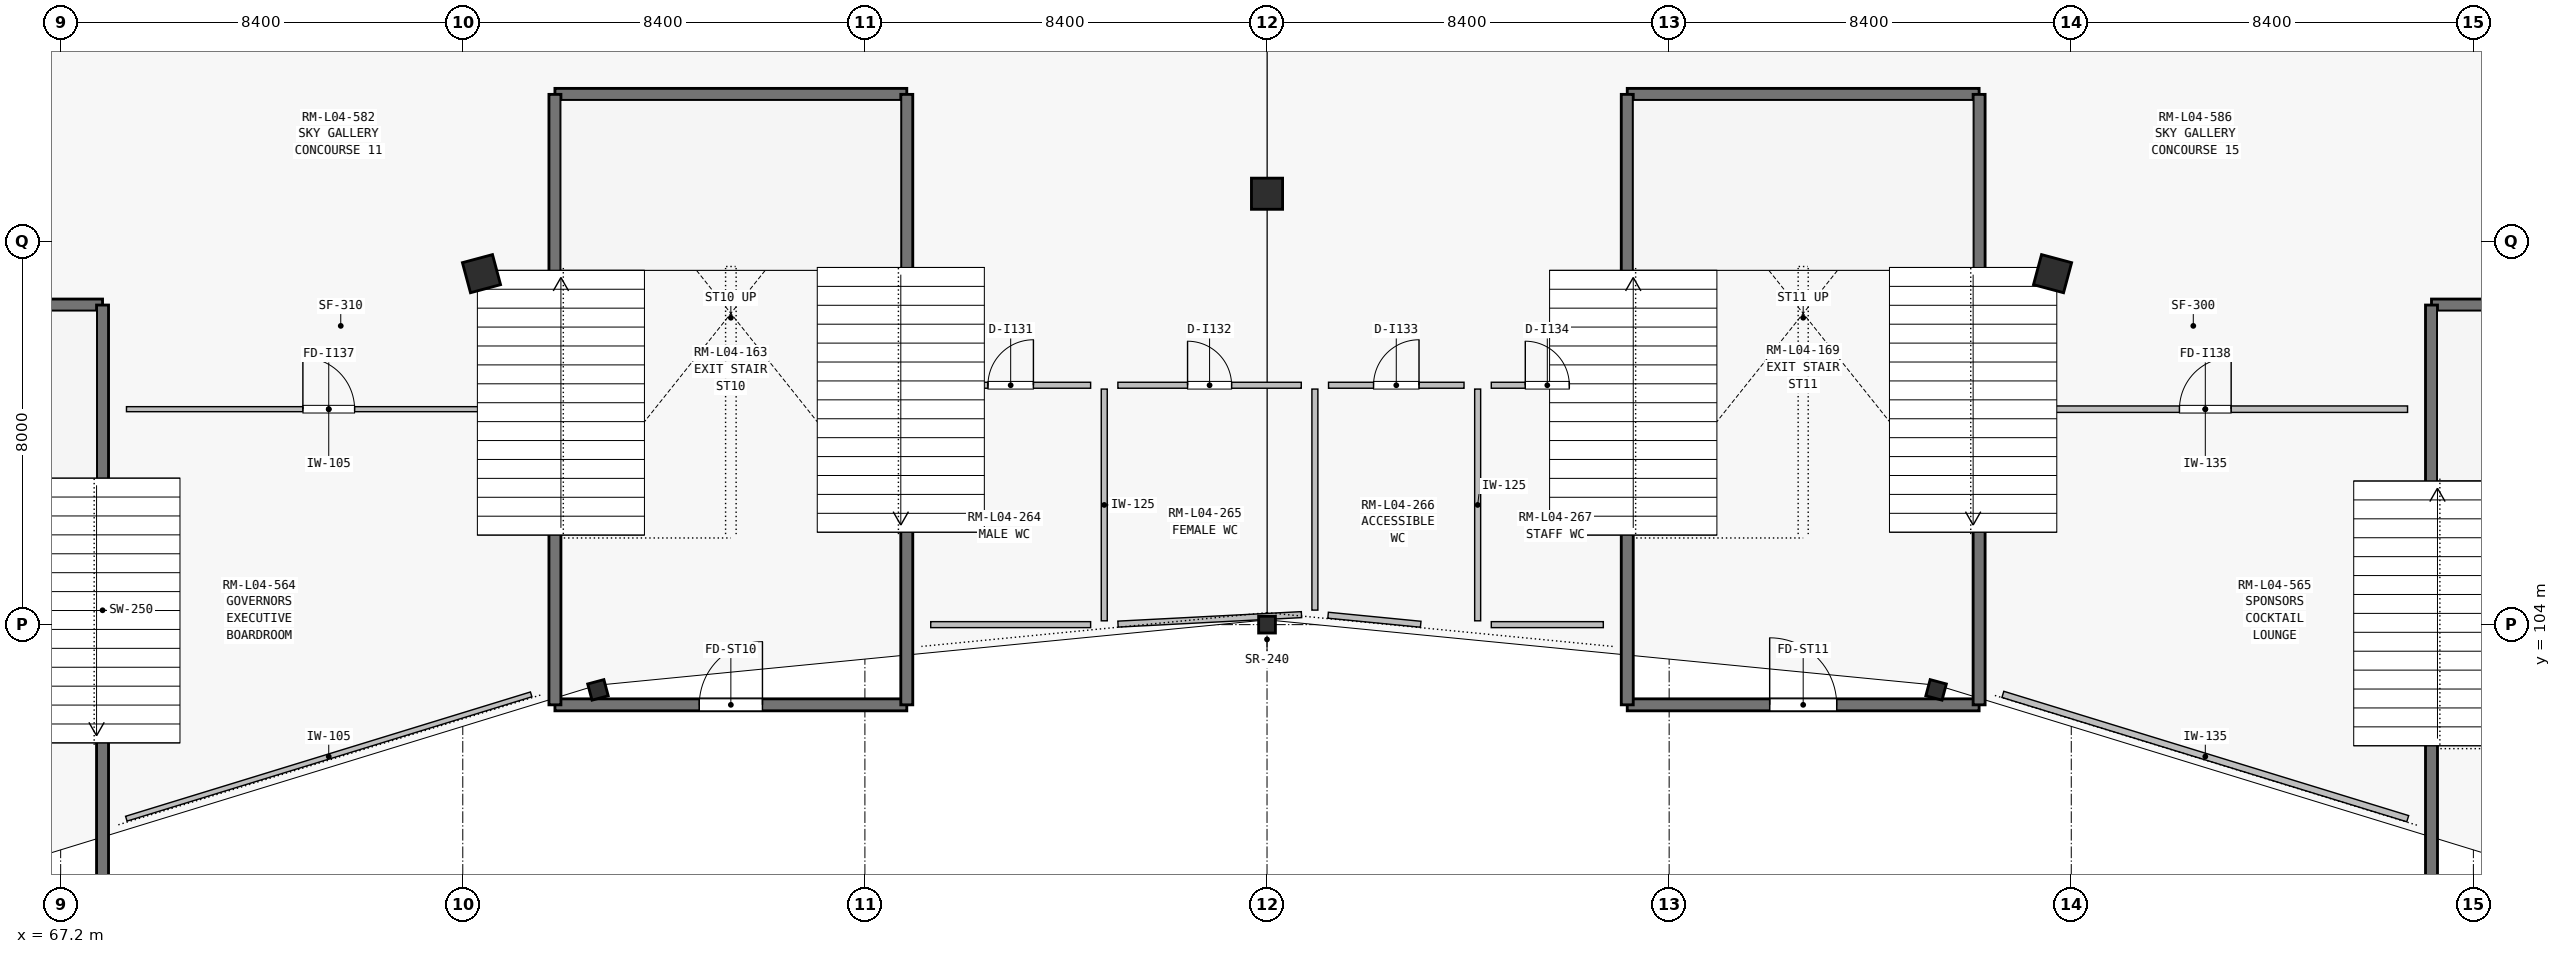
"""IFC4 building model, lengths in metres.
Left out: names, types, materials, properties, quantities, classifications, styles, units other than length and angle.
Written with IfcOpenShell. Run it as: python <this file> out.ifc"""

import sys

from ifc_helpers import new_model, si_unit, direction, frame, frame_2d, origin, origin_2d, place, context, subcontext, project, spatial, rectangle, i_section, extrude, element, fill, save


model = new_model("IFC4")
c1 = context("Model", 3, precision=1e-05, world=origin(), true_north=direction((0.0, 1.0)))
c2 = subcontext(c1, "Body", "Model", "MODEL_VIEW")
j1 = project(units=[si_unit("LENGTHUNIT", "METRE"), si_unit("PLANEANGLEUNIT", "RADIAN")], contexts=[c1])
p1 = place(None, origin())
s1 = spatial("IfcSite", under=j1, at=p1, CompositionType="ELEMENT")
p2 = place(p1, origin())
s2 = spatial("IfcBuilding", under=s1, at=p2, CompositionType="ELEMENT")
p3 = place(p2, frame((0.0, 0.0, 18.9)))
s3 = spatial("IfcBuildingStorey", under=s2, at=p3, CompositionType="ELEMENT", Elevation=18.9)
for number, where, z_axis, x_axis in (
    (1, (106.376, 102.637, 0.0), (0.0, 0.0, 1.0), (0.259, 0.966, 0.0)),
    (2, (92.4, 104.0, 0.0), (0.0, 0.0, 1.0), (0.0, 1.0, 0.0)),
    (3, (78.424, 102.637, 0.0), (0.0, 0.0, 1.0), (-0.259, 0.966, 0.0)),
):
    element("IfcColumn", number, at=place(p3, frame(where, z_axis=z_axis, x_axis=x_axis)), inside=s3, PredefinedType="COLUMN", context=c2, shape_type="SweptSolid", body=[
        extrude(i_section(OverallWidth=0.35, OverallDepth=0.35, WebThickness=0.014, FlangeThickness=0.024, at=origin_2d()), origin(), (0.0, 0.0, 1.0), 4.5),
    ])
for number, where, z_axis, x_axis in (
    (4, (108.809, 111.33, 0.0), (0.0, 0.0, 1.0), (0.259, 0.966, 0.0)),
    (5, (92.4, 113.0, 0.0), (0.0, 0.0, 1.0), (0.0, 1.0, 0.0)),
    (6, (75.991, 111.33, 0.0), (0.0, 0.0, 1.0), (-0.259, 0.966, 0.0)),
):
    element("IfcColumn", number, at=place(p3, frame(where, z_axis=z_axis, x_axis=x_axis)), inside=s3, PredefinedType="COLUMN", context=c2, shape_type="SweptSolid", body=[
        extrude(rectangle(XDim=0.65, YDim=0.65, at=origin_2d()), origin(), (0.0, 0.0, 1.0), 4.5),
    ])
p4 = place(p3, frame((53.1, 115.788, 0.0), z_axis=(0.0, 0.0, 1.0), x_axis=(0.953759231515, 0.300571669159, 0.0)))
e7 = element("IfcWall", 7, at=p4, inside=s3, PredefinedType="PARAPET", context=c2, shape_type="SweptSolid", body=[
    extrude(rectangle(XDim=19.876, YDim=0.225, at=frame_2d((9.938, 0.0))), origin(), (0.0, 0.0, 1.0), 0.95),
])
p5 = place(p3, frame((60.725, 110.675, 0.0), z_axis=(0.0, 0.0, 1.0), x_axis=(1.0, 0.0, 0.0)))
e8 = element("IfcWall", 8, at=p5, inside=s3, PredefinedType="SHEAR", context=c2, shape_type="SweptSolid", body=[
    extrude(rectangle(XDim=7.35, YDim=0.25, at=frame_2d((3.675, 0.0))), origin(), (0.0, 0.0, 1.0), 4.5),
])
p6 = place(p3, frame((68.075, 97.925, 0.0), z_axis=(0.0, 0.0, 1.0), x_axis=(0.0, 1.0, 0.0)))
e9 = element("IfcWall", 9, at=p6, inside=s3, PredefinedType="SHEAR", context=c2, shape_type="SweptSolid", body=[
    extrude(rectangle(XDim=12.75, YDim=0.25, at=frame_2d((6.375, 0.0))), origin(), (0.0, 0.0, 1.0), 4.5),
])
p7 = place(p3, frame((77.525, 102.325, 0.0), z_axis=(0.0, 0.0, 1.0), x_axis=(1.0, 0.0, 0.0)))
e10 = element("IfcWall", 10, at=p7, inside=s3, PredefinedType="SHEAR", context=c2, shape_type="SweptSolid", body=[
    extrude(rectangle(XDim=7.35, YDim=0.25, at=frame_2d((3.675, 0.0))), origin(), (0.0, 0.0, 1.0), 4.5),
])
p8 = place(p7, frame((3.015, 0.0, 0.0)))
e11 = element("IfcOpeningElement", 11, at=p8, cuts=e10, PredefinedType="OPENING", context=c2, shape_type="SweptSolid", body=[
    extrude(rectangle(XDim=1.32, YDim=2.2, at=frame_2d((0.66, 1.1))), frame((0.0, 0.135, 0.0), z_axis=(0.0, -1.0, 0.0), x_axis=(1.0, 0.0, 0.0)), (0.0, 0.0, 1.0), 0.27),
])
p9 = place(p3, frame((77.525, 115.075, 0.0), z_axis=(0.0, 0.0, 1.0), x_axis=(1.0, 0.0, 0.0)))
e12 = element("IfcWall", 12, at=p9, inside=s3, PredefinedType="SHEAR", context=c2, shape_type="SweptSolid", body=[
    extrude(rectangle(XDim=7.35, YDim=0.25, at=frame_2d((3.675, 0.0))), origin(), (0.0, 0.0, 1.0), 4.5),
])
for number, where, z_axis, x_axis in (
    (13, (77.525, 102.325, 0.0), (0.0, 0.0, 1.0), (0.0, 1.0, 0.0)),
    (14, (84.875, 102.325, 0.0), (0.0, 0.0, 1.0), (0.0, 1.0, 0.0)),
):
    element("IfcWall", number, at=place(p3, frame(where, z_axis=z_axis, x_axis=x_axis)), inside=s3, PredefinedType="SHEAR", context=c2, shape_type="SweptSolid", body=[
        extrude(rectangle(XDim=12.75, YDim=0.25, at=frame_2d((6.375, 0.0))), origin(), (0.0, 0.0, 1.0), 4.5),
    ])
p10 = place(p3, frame((99.925, 102.325, 0.0), z_axis=(0.0, 0.0, 1.0), x_axis=(1.0, 0.0, 0.0)))
e15 = element("IfcWall", 15, at=p10, inside=s3, PredefinedType="SHEAR", context=c2, shape_type="SweptSolid", body=[
    extrude(rectangle(XDim=7.35, YDim=0.25, at=frame_2d((3.675, 0.0))), origin(), (0.0, 0.0, 1.0), 4.5),
])
p11 = place(p10, frame((2.975, 0.0, 0.0)))
e16 = element("IfcOpeningElement", 16, at=p11, cuts=e15, PredefinedType="OPENING", context=c2, shape_type="SweptSolid", body=[
    extrude(rectangle(XDim=1.4, YDim=2.2, at=frame_2d((0.7, 1.1))), frame((0.0, 0.135, 0.0), z_axis=(0.0, -1.0, 0.0), x_axis=(1.0, 0.0, 0.0)), (0.0, 0.0, 1.0), 0.27),
])
p12 = place(p3, frame((99.925, 115.075, 0.0), z_axis=(0.0, 0.0, 1.0), x_axis=(1.0, 0.0, 0.0)))
e17 = element("IfcWall", 17, at=p12, inside=s3, PredefinedType="SHEAR", context=c2, shape_type="SweptSolid", body=[
    extrude(rectangle(XDim=7.35, YDim=0.25, at=frame_2d((3.675, 0.0))), origin(), (0.0, 0.0, 1.0), 4.5),
])
for number, where, z_axis, x_axis in (
    (18, (99.925, 102.325, 0.0), (0.0, 0.0, 1.0), (0.0, 1.0, 0.0)),
    (19, (107.275, 102.325, 0.0), (0.0, 0.0, 1.0), (0.0, 1.0, 0.0)),
):
    element("IfcWall", number, at=place(p3, frame(where, z_axis=z_axis, x_axis=x_axis)), inside=s3, PredefinedType="SHEAR", context=c2, shape_type="SweptSolid", body=[
        extrude(rectangle(XDim=12.75, YDim=0.25, at=frame_2d((6.375, 0.0))), origin(), (0.0, 0.0, 1.0), 4.5),
    ])
p13 = place(p3, frame((116.725, 110.675, 0.0), z_axis=(0.0, 0.0, 1.0), x_axis=(1.0, 0.0, 0.0)))
e20 = element("IfcWall", 20, at=p13, inside=s3, PredefinedType="SHEAR", context=c2, shape_type="SweptSolid", body=[
    extrude(rectangle(XDim=7.35, YDim=0.25, at=frame_2d((3.675, 0.0))), origin(), (0.0, 0.0, 1.0), 4.5),
])
p14 = place(p3, frame((116.725, 97.925, 0.0), z_axis=(0.0, 0.0, 1.0), x_axis=(0.0, 1.0, 0.0)))
e21 = element("IfcWall", 21, at=p14, inside=s3, PredefinedType="SHEAR", context=c2, shape_type="SweptSolid", body=[
    extrude(rectangle(XDim=12.75, YDim=0.25, at=frame_2d((6.375, 0.0))), origin(), (0.0, 0.0, 1.0), 4.5),
])
p15 = place(p3, frame((89.0, 108.92, 0.0), z_axis=(0.0, 0.0, 1.0), x_axis=(0.0, -1.0, 0.0)))
e22 = element("IfcWall", 22, at=p15, inside=s3, PredefinedType="PARTITIONING", context=c2, shape_type="SweptSolid", body=[
    extrude(rectangle(XDim=4.84, YDim=0.125, at=frame_2d((2.42, 0.0))), origin(), (0.0, 0.0, 1.0), 4.22),
])
p16 = place(p3, frame((88.715, 104.0, 0.0), z_axis=(0.0, 0.0, 1.0), x_axis=(-1.0, 0.0, 0.0)))
e23 = element("IfcWall", 23, at=p16, inside=s3, PredefinedType="PARTITIONING", context=c2, shape_type="SweptSolid", body=[
    extrude(rectangle(XDim=3.34, YDim=0.125, at=frame_2d((1.67, 0.0))), origin(), (0.0, 0.0, 1.0), 4.22),
])
p17 = place(p3, frame((85.375, 109.0, 0.0), z_axis=(0.0, 0.0, 1.0), x_axis=(1.0, 0.0, 0.0)))
e24 = element("IfcWall", 24, at=p17, inside=s3, PredefinedType="PARTITIONING", context=c2, shape_type="SweptSolid", body=[
    extrude(rectangle(XDim=3.34, YDim=0.125, at=frame_2d((1.67, 0.0))), origin(), (0.0, 0.0, 1.0), 4.22),
])
p18 = place(p17, frame((1.195, 0.0, 0.0)))
e25 = element("IfcOpeningElement", 25, at=p18, cuts=e24, PredefinedType="OPENING", context=c2, shape_type="SweptSolid", body=[
    extrude(rectangle(XDim=0.95, YDim=2.1, at=frame_2d((0.475, 1.05))), frame((0.0, 0.073, 0.0), z_axis=(0.0, -1.0, 0.0), x_axis=(1.0, 0.0, 0.0)), (0.0, 0.0, 1.0), 0.145),
])
p19 = place(p3, frame((93.4, 108.92, 0.0), z_axis=(0.0, 0.0, 1.0), x_axis=(0.0, -1.0, 0.0)))
e26 = element("IfcWall", 26, at=p19, inside=s3, PredefinedType="PARTITIONING", context=c2, shape_type="SweptSolid", body=[
    extrude(rectangle(XDim=4.616, YDim=0.125, at=frame_2d((2.308, 0.0))), origin(), (0.0, 0.0, 1.0), 4.21),
])
p20 = place(p3, frame((93.12, 104.209, 0.0), z_axis=(0.0, 0.0, 1.0), x_axis=(-0.99866504152, -0.051653991574, 0.0)))
e27 = element("IfcWall", 27, at=p20, inside=s3, PredefinedType="PARTITIONING", context=c2, shape_type="SweptSolid", body=[
    extrude(rectangle(XDim=3.838, YDim=0.125, at=frame_2d((1.919, 0.0))), origin(), (0.0, 0.0, 1.0), 3.779),
])
p21 = place(p3, frame((89.285, 109.0, 0.0), z_axis=(0.0, 0.0, 1.0), x_axis=(1.0, 0.0, 0.0)))
e28 = element("IfcWall", 28, at=p21, inside=s3, PredefinedType="PARTITIONING", context=c2, shape_type="SweptSolid", body=[
    extrude(rectangle(XDim=3.83, YDim=0.125, at=frame_2d((1.915, 0.0))), origin(), (0.0, 0.0, 1.0), 3.779),
])
p22 = place(p21, frame((1.455, 0.0, 0.0)))
e29 = element("IfcOpeningElement", 29, at=p22, cuts=e28, PredefinedType="OPENING", context=c2, shape_type="SweptSolid", body=[
    extrude(rectangle(XDim=0.92, YDim=2.1, at=frame_2d((0.46, 1.05))), frame((0.0, 0.073, 0.0), z_axis=(0.0, -1.0, 0.0), x_axis=(1.0, 0.0, 0.0)), (0.0, 0.0, 1.0), 0.145),
])
p23 = place(p3, frame((96.8, 108.92, 0.0), z_axis=(0.0, 0.0, 1.0), x_axis=(0.0, -1.0, 0.0)))
e30 = element("IfcWall", 30, at=p23, inside=s3, PredefinedType="PARTITIONING", context=c2, shape_type="SweptSolid", body=[
    extrude(rectangle(XDim=4.84, YDim=0.125, at=frame_2d((2.42, 0.0))), origin(), (0.0, 0.0, 1.0), 4.21),
])
p24 = place(p3, frame((95.61, 104.008, 0.0), z_axis=(0.0, 0.0, 1.0), x_axis=(-0.995275522058, 0.097090860494, 0.0)))
e31 = element("IfcWall", 31, at=p24, inside=s3, PredefinedType="PARTITIONING", context=c2, shape_type="SweptSolid", body=[
    extrude(rectangle(XDim=1.944, YDim=0.125, at=frame_2d((0.972, 0.0))), origin(), (0.0, 0.0, 1.0), 4.21),
])
p25 = place(p3, frame((93.685, 109.0, 0.0), z_axis=(0.0, 0.0, 1.0), x_axis=(1.0, 0.0, 0.0)))
e32 = element("IfcWall", 32, at=p25, inside=s3, PredefinedType="PARTITIONING", context=c2, shape_type="SweptSolid", body=[
    extrude(rectangle(XDim=2.83, YDim=0.125, at=frame_2d((1.415, 0.0))), origin(), (0.0, 0.0, 1.0), 4.21),
])
p26 = place(p25, frame((0.94, 0.0, 0.0)))
e33 = element("IfcOpeningElement", 33, at=p26, cuts=e32, PredefinedType="OPENING", context=c2, shape_type="SweptSolid", body=[
    extrude(rectangle(XDim=0.95, YDim=2.1, at=frame_2d((0.475, 1.05))), frame((0.0, 0.073, 0.0), z_axis=(0.0, -1.0, 0.0), x_axis=(1.0, 0.0, 0.0)), (0.0, 0.0, 1.0), 0.145),
])
p27 = place(p3, frame((99.425, 104.0, 0.0), z_axis=(0.0, 0.0, 1.0), x_axis=(-1.0, 0.0, 0.0)))
e34 = element("IfcWall", 34, at=p27, inside=s3, PredefinedType="PARTITIONING", context=c2, shape_type="SweptSolid", body=[
    extrude(rectangle(XDim=2.34, YDim=0.125, at=frame_2d((1.17, 0.0))), origin(), (0.0, 0.0, 1.0), 4.21),
])
p28 = place(p3, frame((97.085, 109.0, 0.0), z_axis=(0.0, 0.0, 1.0), x_axis=(1.0, 0.0, 0.0)))
e35 = element("IfcWall", 35, at=p28, inside=s3, PredefinedType="PARTITIONING", context=c2, shape_type="SweptSolid", body=[
    extrude(rectangle(XDim=2.34, YDim=0.125, at=frame_2d((1.17, 0.0))), origin(), (0.0, 0.0, 1.0), 4.21),
])
p29 = place(p28, frame((0.71, 0.0, 0.0)))
e36 = element("IfcOpeningElement", 36, at=p29, cuts=e35, PredefinedType="OPENING", context=c2, shape_type="SweptSolid", body=[
    extrude(rectangle(XDim=0.92, YDim=2.1, at=frame_2d((0.46, 1.05))), frame((0.0, 0.073, 0.0), z_axis=(0.0, -1.0, 0.0), x_axis=(1.0, 0.0, 0.0)), (0.0, 0.0, 1.0), 0.145),
])
p30 = place(p3, frame((77.029, 102.543, 0.0), z_axis=(0.0, 0.0, 1.0), x_axis=(-0.955968559478, -0.293469101082, 0.0)))
e37 = element("IfcWall", 37, at=p30, inside=s3, PredefinedType="PARTITIONING", context=c2, shape_type="SweptSolid", body=[
    extrude(rectangle(XDim=8.847, YDim=0.105, at=frame_2d((4.423, 0.0))), origin(), (0.0, 0.0, 1.0), 4.22),
])
p31 = place(p3, frame((68.575, 108.5, 0.0), z_axis=(0.0, 0.0, 1.0), x_axis=(1.0, 0.0, 0.0)))
e38 = element("IfcWall", 38, at=p31, inside=s3, PredefinedType="PARTITIONING", context=c2, shape_type="SweptSolid", body=[
    extrude(rectangle(XDim=8.45, YDim=0.105, at=frame_2d((4.225, 0.0))), origin(), (0.0, 0.0, 1.0), 3.789),
])
p32 = place(p31, frame((3.685, 0.0, 0.0)))
e39 = element("IfcOpeningElement", 39, at=p32, cuts=e38, PredefinedType="OPENING", context=c2, shape_type="SweptSolid", body=[
    extrude(rectangle(XDim=1.08, YDim=2.15, at=frame_2d((0.54, 1.075))), frame((0.0, 0.062, 0.0), z_axis=(0.0, -1.0, 0.0), x_axis=(1.0, 0.0, 0.0)), (0.0, 0.0, 1.0), 0.125),
])
p33 = place(p3, frame((116.229, 99.947, 0.0), z_axis=(0.0, 0.0, 1.0), x_axis=(-0.955968559478, 0.293469101082, 0.0)))
e40 = element("IfcWall", 40, at=p33, inside=s3, PredefinedType="PARTITIONING", context=c2, shape_type="SweptSolid", body=[
    extrude(rectangle(XDim=8.847, YDim=0.135, at=frame_2d((4.423, 0.0))), origin(), (0.0, 0.0, 1.0), 4.21),
])
p34 = place(p3, frame((107.775, 108.5, 0.0), z_axis=(0.0, 0.0, 1.0), x_axis=(1.0, 0.0, 0.0)))
e41 = element("IfcWall", 41, at=p34, inside=s3, PredefinedType="PARTITIONING", context=c2, shape_type="SweptSolid", body=[
    extrude(rectangle(XDim=8.45, YDim=0.135, at=frame_2d((4.225, 0.0))), origin(), (0.0, 0.0, 1.0), 3.779),
])
p35 = place(p34, frame((3.685, 0.0, 0.0)))
e42 = element("IfcOpeningElement", 42, at=p35, cuts=e41, PredefinedType="OPENING", context=c2, shape_type="SweptSolid", body=[
    extrude(rectangle(XDim=1.08, YDim=2.15, at=frame_2d((0.54, 1.075))), frame((0.0, 0.077, 0.0), z_axis=(0.0, -1.0, 0.0), x_axis=(1.0, 0.0, 0.0)), (0.0, 0.0, 1.0), 0.155),
])
p36 = place(p8, origin())
e43 = element("IfcDoor", 43, at=p36, inside=s3, OperationType="SINGLE_SWING_RIGHT", PredefinedType="DOOR", context=c2, shape_type="SweptSolid", body=[
    extrude(rectangle(XDim=1.32, YDim=2.2, at=frame_2d((0.66, 1.1))), frame((0.0, 0.025, 0.0), z_axis=(0.0, -1.0, 0.0), x_axis=(1.0, 0.0, 0.0)), (0.0, 0.0, 1.0), 0.05),
])
fill(e11, e43)
p37 = place(p11, origin())
e44 = element("IfcDoor", 44, at=p37, inside=s3, OperationType="SINGLE_SWING_LEFT", PredefinedType="DOOR", context=c2, shape_type="SweptSolid", body=[
    extrude(rectangle(XDim=1.4, YDim=2.2, at=frame_2d((0.7, 1.1))), frame((0.0, 0.025, 0.0), z_axis=(0.0, -1.0, 0.0), x_axis=(1.0, 0.0, 0.0)), (0.0, 0.0, 1.0), 0.05),
])
fill(e16, e44)
p38 = place(p18, origin())
e45 = element("IfcDoor", 45, at=p38, inside=s3, OperationType="SINGLE_SWING_RIGHT", PredefinedType="DOOR", context=c2, shape_type="SweptSolid", body=[
    extrude(rectangle(XDim=0.95, YDim=2.1, at=frame_2d((0.475, 1.05))), frame((0.0, 0.025, 0.0), z_axis=(0.0, -1.0, 0.0), x_axis=(1.0, 0.0, 0.0)), (0.0, 0.0, 1.0), 0.05),
])
fill(e25, e45)
p39 = place(p22, origin())
e46 = element("IfcDoor", 46, at=p39, inside=s3, OperationType="SINGLE_SWING_LEFT", PredefinedType="DOOR", context=c2, shape_type="SweptSolid", body=[
    extrude(rectangle(XDim=0.92, YDim=2.1, at=frame_2d((0.46, 1.05))), frame((0.0, 0.025, 0.0), z_axis=(0.0, -1.0, 0.0), x_axis=(1.0, 0.0, 0.0)), (0.0, 0.0, 1.0), 0.05),
])
fill(e29, e46)
p40 = place(p26, origin())
e47 = element("IfcDoor", 47, at=p40, inside=s3, OperationType="SINGLE_SWING_RIGHT", PredefinedType="DOOR", context=c2, shape_type="SweptSolid", body=[
    extrude(rectangle(XDim=0.95, YDim=2.1, at=frame_2d((0.475, 1.05))), frame((0.0, 0.025, 0.0), z_axis=(0.0, -1.0, 0.0), x_axis=(1.0, 0.0, 0.0)), (0.0, 0.0, 1.0), 0.05),
])
fill(e33, e47)
p41 = place(p29, origin())
e48 = element("IfcDoor", 48, at=p41, inside=s3, OperationType="SINGLE_SWING_LEFT", PredefinedType="DOOR", context=c2, shape_type="SweptSolid", body=[
    extrude(rectangle(XDim=0.92, YDim=2.1, at=frame_2d((0.46, 1.05))), frame((0.0, 0.025, 0.0), z_axis=(0.0, -1.0, 0.0), x_axis=(1.0, 0.0, 0.0)), (0.0, 0.0, 1.0), 0.05),
])
fill(e36, e48)
p42 = place(p32, origin())
e49 = element("IfcDoor", 49, at=p42, inside=s3, OperationType="SINGLE_SWING_LEFT", PredefinedType="DOOR", context=c2, shape_type="SweptSolid", body=[
    extrude(rectangle(XDim=1.08, YDim=2.15, at=frame_2d((0.54, 1.075))), frame((0.0, 0.025, 0.0), z_axis=(0.0, -1.0, 0.0), x_axis=(1.0, 0.0, 0.0)), (0.0, 0.0, 1.0), 0.05),
])
fill(e39, e49)
p43 = place(p35, origin())
e50 = element("IfcDoor", 50, at=p43, inside=s3, OperationType="SINGLE_SWING_RIGHT", PredefinedType="DOOR", context=c2, shape_type="SweptSolid", body=[
    extrude(rectangle(XDim=1.08, YDim=2.15, at=frame_2d((0.54, 1.075))), frame((0.0, 0.025, 0.0), z_axis=(0.0, -1.0, 0.0), x_axis=(1.0, 0.0, 0.0)), (0.0, 0.0, 1.0), 0.05),
])
fill(e42, e50)
save(model, sys.argv[1])
